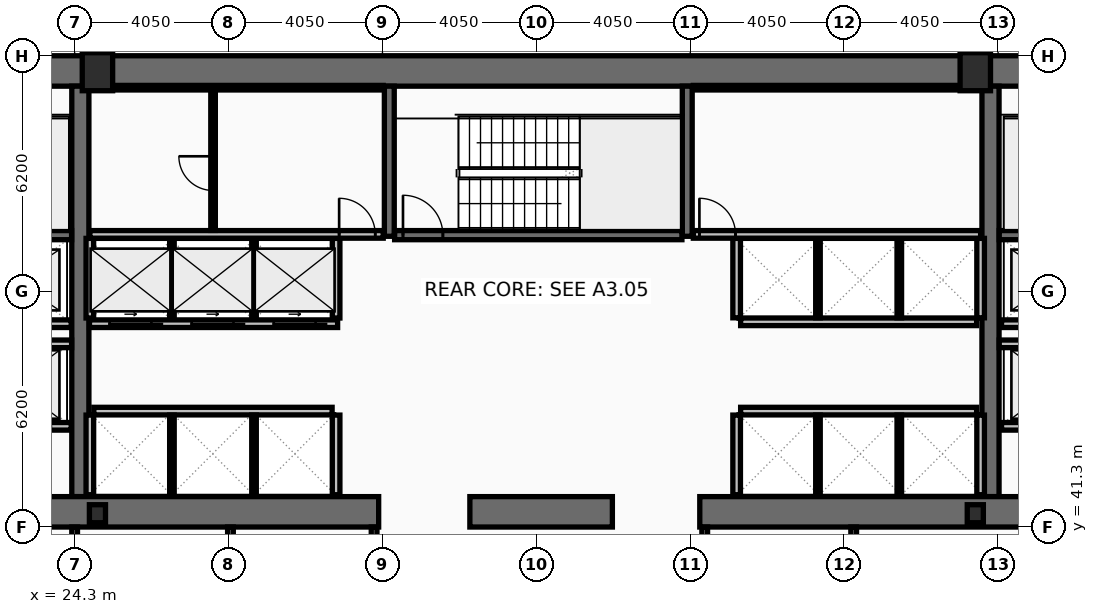
"""IFC4 building model, lengths in metres.
Left out: names, types, materials, properties, quantities, classifications, styles, units other than length and angle.
Written with IfcOpenShell. Run it as: python <this file> out.ifc"""

import sys

from ifc_helpers import new_model, si_unit, direction, frame, frame_2d, origin, origin_2d, place, context, subcontext, project, spatial, rectangle, hollow_rectangle, i_section, extrude, element, fill, save


model = new_model("IFC4")
c1 = context("Model", 3, precision=1e-05, world=origin(), true_north=direction((0.0, 1.0)))
c2 = subcontext(c1, "Body", "Model", "MODEL_VIEW")
j1 = project(units=[si_unit("LENGTHUNIT", "METRE"), si_unit("PLANEANGLEUNIT", "RADIAN")], contexts=[c1])
p1 = place(None, origin())
s1 = spatial("IfcSite", under=j1, at=p1, CompositionType="ELEMENT")
p2 = place(p1, origin())
s2 = spatial("IfcBuilding", under=s1, at=p2, CompositionType="ELEMENT")
p3 = place(p2, frame((0.0, 0.0, 29.8)))
s3 = spatial("IfcBuildingStorey", under=s2, at=p3, CompositionType="ELEMENT", Elevation=29.8)
p4 = place(p3, frame((16.2, 53.3, 0.0), z_axis=(0.0, 0.0, 1.0), x_axis=(1.0, 0.0, 0.0)))
e1 = element("IfcWall", 1, at=p4, inside=s3, PredefinedType="SHEAR", context=c2, shape_type="SweptSolid", body=[
    extrude(rectangle(XDim=40.5, YDim=0.8, at=frame_2d((20.25, 0.0))), origin(), (0.0, 0.0, 1.0), 3.82),
])
for number, where, z_axis, x_axis in (
    (2, (24.45, 42.1, 0.0), (0.0, 0.0, 1.0), (0.0, 1.0, 0.0)),
    (3, (48.4, 42.1, 0.0), (0.0, 0.0, 1.0), (0.0, 1.0, 0.0)),
):
    element("IfcWall", number, at=place(p3, frame(where, z_axis=z_axis, x_axis=x_axis)), inside=s3, PredefinedType="SHEAR", context=c2, shape_type="SweptSolid", body=[
        extrude(rectangle(XDim=10.8, YDim=0.45, at=frame_2d((5.4, 0.0))), origin(), (0.0, 0.0, 1.0), 3.82),
    ])
p5 = place(p3, frame((32.3, 41.7, 0.0), z_axis=(0.0, 0.0, 1.0), x_axis=(-1.0, 0.0, 0.0)))
e4 = element("IfcWall", 4, at=p5, inside=s3, PredefinedType="SHEAR", context=c2, shape_type="SweptSolid", body=[
    extrude(rectangle(XDim=11.45, YDim=0.8, at=frame_2d((5.725, 0.0))), origin(), (0.0, 0.0, 1.0), 3.82),
])
p6 = place(p3, frame((38.45, 41.7, 0.0), z_axis=(0.0, 0.0, 1.0), x_axis=(-1.0, 0.0, 0.0)))
e5 = element("IfcWall", 5, at=p6, inside=s3, PredefinedType="SHEAR", context=c2, shape_type="SweptSolid", body=[
    extrude(rectangle(XDim=3.75, YDim=0.8, at=frame_2d((1.875, 0.0))), origin(), (0.0, 0.0, 1.0), 3.82),
])
p7 = place(p3, frame((52.05, 41.7, 0.0), z_axis=(0.0, 0.0, 1.0), x_axis=(-1.0, 0.0, 0.0)))
e6 = element("IfcWall", 6, at=p7, inside=s3, PredefinedType="SHEAR", context=c2, shape_type="SweptSolid", body=[
    extrude(rectangle(XDim=11.3, YDim=0.8, at=frame_2d((5.65, 0.0))), origin(), (0.0, 0.0, 1.0), 3.82),
])
for number, where, z_axis, x_axis in (
    (7, (32.58, 48.95, 0.0), (0.0, 0.0, 1.0), (0.0, 1.0, 0.0)),
    (8, (40.42, 48.95, 0.0), (0.0, 0.0, 1.0), (0.0, 1.0, 0.0)),
):
    element("IfcWall", number, at=place(p3, frame(where, z_axis=z_axis, x_axis=x_axis)), inside=s3, PredefinedType="SHEAR", context=c2, shape_type="SweptSolid", body=[
        extrude(rectangle(XDim=3.95, YDim=0.26, at=frame_2d((1.975, 0.0))), origin(), (0.0, 0.0, 1.0), 3.82),
    ])
p8 = place(p3, frame((17.0, 48.98, 0.0), z_axis=(0.0, 0.0, 1.0), x_axis=(1.0, 0.0, 0.0)))
e9 = element("IfcWall", 9, at=p8, inside=s3, PredefinedType="SHEAR", context=c2, shape_type="SweptSolid", body=[
    extrude(rectangle(XDim=7.22, YDim=0.24, at=frame_2d((3.61, 0.0))), origin(), (0.0, 0.0, 1.0), 3.82),
])
p9 = place(p8, frame((0.22, 0.0, 0.0)))
e10 = element("IfcOpeningElement", 10, at=p9, cuts=e9, PredefinedType="OPENING", context=c2, shape_type="SweptSolid", body=[
    extrude(rectangle(XDim=1.05, YDim=2.15, at=frame_2d((0.525, 1.075))), frame((0.0, 0.13, 0.0), z_axis=(0.0, -1.0, 0.0), x_axis=(1.0, 0.0, 0.0)), (0.0, 0.0, 1.0), 0.26),
])
p10 = place(p3, frame((48.63, 48.98, 0.0), z_axis=(0.0, 0.0, 1.0), x_axis=(1.0, 0.0, 0.0)))
e11 = element("IfcWall", 11, at=p10, inside=s3, PredefinedType="SHEAR", context=c2, shape_type="SweptSolid", body=[
    extrude(rectangle(XDim=7.27, YDim=0.24, at=frame_2d((3.635, 0.0))), origin(), (0.0, 0.0, 1.0), 3.82),
])
p11 = place(p10, frame((6.0, 0.0, 0.0)))
e12 = element("IfcOpeningElement", 12, at=p11, cuts=e11, PredefinedType="OPENING", context=c2, shape_type="SweptSolid", body=[
    extrude(rectangle(XDim=1.05, YDim=2.15, at=frame_2d((0.525, 1.075))), frame((0.0, 0.13, 0.0), z_axis=(0.0, -1.0, 0.0), x_axis=(1.0, 0.0, 0.0)), (0.0, 0.0, 1.0), 0.26),
])
p12 = place(p3, frame((32.72, 48.98, 0.0), z_axis=(0.0, 0.0, 1.0), x_axis=(1.0, 0.0, 0.0)))
e13 = element("IfcWall", 13, at=p12, inside=s3, PredefinedType="SHEAR", context=c2, shape_type="SweptSolid", body=[
    extrude(rectangle(XDim=7.56, YDim=0.24, at=frame_2d((3.78, 0.0))), origin(), (0.0, 0.0, 1.0), 3.82),
])
p13 = place(p12, frame((0.22, 0.0, 0.0)))
e14 = element("IfcOpeningElement", 14, at=p13, cuts=e13, PredefinedType="OPENING", context=c2, shape_type="SweptSolid", body=[
    extrude(rectangle(XDim=1.05, YDim=2.15, at=frame_2d((0.525, 1.075))), frame((0.0, 0.13, 0.0), z_axis=(0.0, -1.0, 0.0), x_axis=(1.0, 0.0, 0.0)), (0.0, 0.0, 1.0), 0.26),
])
for number, where, z_axis, x_axis in (
    (15, (24.9, 53.28, 0.0), (0.0, 0.0, 1.0), (1.0, 0.0, 0.0)),
    (16, (48.0, 53.28, 0.0), (0.0, 0.0, 1.0), (1.0, 0.0, 0.0)),
):
    element("IfcColumn", number, at=place(p3, frame(where, z_axis=z_axis, x_axis=x_axis)), inside=s3, PredefinedType="COLUMN", context=c2, shape_type="SweptSolid", body=[
        extrude(hollow_rectangle(XDim=0.8, YDim=1.0, WallThickness=0.055, at=origin_2d()), origin(), (0.0, 0.0, 1.0), 4.0),
    ])
for number, where, z_axis, x_axis in (
    (17, (24.9, 41.65, 0.0), (0.0, 0.0, 1.0), (1.0, 0.0, 0.0)),
    (18, (48.0, 41.65, 0.0), (0.0, 0.0, 1.0), (1.0, 0.0, 0.0)),
):
    element("IfcColumn", number, at=place(p3, frame(where, z_axis=z_axis, x_axis=x_axis)), inside=s3, PredefinedType="COLUMN", context=c2, shape_type="SweptSolid", body=[
        extrude(i_section(OverallWidth=0.424, OverallDepth=0.474, WebThickness=0.048, FlangeThickness=0.077, at=origin_2d()), origin(), (0.0, 0.0, 1.0), 4.0),
    ])
p14 = place(p3, frame((51.61, 43.95, 0.0), z_axis=(0.0, 0.0, 1.0), x_axis=(-1.0, 0.0, 0.0)))
e19 = element("IfcWall", 19, at=p14, inside=s3, PredefinedType="PARTITIONING", context=c2, shape_type="SweptSolid", body=[
    extrude(rectangle(XDim=2.92, YDim=0.2, at=frame_2d((1.46, 0.0))), origin(), (0.0, 0.0, 1.0), 3.82),
])
p15 = place(p14, frame((0.81, 0.0, 0.0)))
e20 = element("IfcOpeningElement", 20, at=p15, cuts=e19, PredefinedType="OPENING", context=c2, shape_type="SweptSolid", body=[
    extrude(rectangle(XDim=1.3, YDim=2.18, at=frame_2d((0.65, 1.09))), frame((0.0, 0.11, 0.0), z_axis=(0.0, -1.0, 0.0), x_axis=(1.0, 0.0, 0.0)), (0.0, 0.0, 1.0), 0.22),
])
p16 = place(p3, frame((24.21, 43.95, 0.0), z_axis=(0.0, 0.0, 1.0), x_axis=(-1.0, 0.0, 0.0)))
e21 = element("IfcWall", 21, at=p16, inside=s3, PredefinedType="PARTITIONING", context=c2, shape_type="SweptSolid", body=[
    extrude(rectangle(XDim=2.97, YDim=0.2, at=frame_2d((1.485, 0.0))), origin(), (0.0, 0.0, 1.0), 3.82),
])
p17 = place(p16, frame((0.86, 0.0, 0.0)))
e22 = element("IfcOpeningElement", 22, at=p17, cuts=e21, PredefinedType="OPENING", context=c2, shape_type="SweptSolid", body=[
    extrude(rectangle(XDim=1.3, YDim=2.18, at=frame_2d((0.65, 1.09))), frame((0.0, 0.11, 0.0), z_axis=(0.0, -1.0, 0.0), x_axis=(1.0, 0.0, 0.0)), (0.0, 0.0, 1.0), 0.22),
])
p18 = place(p3, frame((51.61, 46.65, 0.0), z_axis=(0.0, 0.0, 1.0), x_axis=(-1.0, 0.0, 0.0)))
e23 = element("IfcWall", 23, at=p18, inside=s3, PredefinedType="PARTITIONING", context=c2, shape_type="SweptSolid", body=[
    extrude(rectangle(XDim=2.92, YDim=0.2, at=frame_2d((1.46, 0.0))), origin(), (0.0, 0.0, 1.0), 3.82),
])
p19 = place(p18, frame((0.86, 0.0, 0.0)))
e24 = element("IfcOpeningElement", 24, at=p19, cuts=e23, PredefinedType="OPENING", context=c2, shape_type="SweptSolid", body=[
    extrude(rectangle(XDim=1.2, YDim=2.18, at=frame_2d((0.6, 1.09))), frame((0.0, 0.11, 0.0), z_axis=(0.0, -1.0, 0.0), x_axis=(1.0, 0.0, 0.0)), (0.0, 0.0, 1.0), 0.22),
])
p20 = place(p3, frame((24.21, 46.65, 0.0), z_axis=(0.0, 0.0, 1.0), x_axis=(-1.0, 0.0, 0.0)))
e25 = element("IfcWall", 25, at=p20, inside=s3, PredefinedType="PARTITIONING", context=c2, shape_type="SweptSolid", body=[
    extrude(rectangle(XDim=2.97, YDim=0.2, at=frame_2d((1.485, 0.0))), origin(), (0.0, 0.0, 1.0), 3.82),
])
p21 = place(p20, frame((0.91, 0.0, 0.0)))
e26 = element("IfcOpeningElement", 26, at=p21, cuts=e25, PredefinedType="OPENING", context=c2, shape_type="SweptSolid", body=[
    extrude(rectangle(XDim=1.2, YDim=2.18, at=frame_2d((0.6, 1.09))), frame((0.0, 0.11, 0.0), z_axis=(0.0, -1.0, 0.0), x_axis=(1.0, 0.0, 0.0)), (0.0, 0.0, 1.0), 0.22),
])
p22 = place(p3, frame((31.22, 46.65, 0.0), z_axis=(0.0, 0.0, 1.0), x_axis=(-1.0, 0.0, 0.0)))
e27 = element("IfcWall", 27, at=p22, inside=s3, PredefinedType="PARTITIONING", context=c2, shape_type="SweptSolid", body=[
    extrude(rectangle(XDim=6.53, YDim=0.2, at=frame_2d((3.265, 0.0))), origin(), (0.0, 0.0, 1.0), 3.82),
])
p23 = place(p22, frame((4.9, 0.0, 0.0)))
e28 = element("IfcOpeningElement", 28, at=p23, cuts=e27, PredefinedType="OPENING", context=c2, shape_type="SweptSolid", body=[
    extrude(rectangle(XDim=1.1, YDim=2.18, at=frame_2d((0.55, 1.09))), frame((0.0, 0.11, 0.0), z_axis=(0.0, -1.0, 0.0), x_axis=(1.0, 0.0, 0.0)), (0.0, 0.0, 1.0), 0.22),
])
p24 = place(p22, frame((2.74, 0.0, 0.0)))
e29 = element("IfcOpeningElement", 29, at=p24, cuts=e27, PredefinedType="OPENING", context=c2, shape_type="SweptSolid", body=[
    extrude(rectangle(XDim=1.1, YDim=2.18, at=frame_2d((0.55, 1.09))), frame((0.0, 0.11, 0.0), z_axis=(0.0, -1.0, 0.0), x_axis=(1.0, 0.0, 0.0)), (0.0, 0.0, 1.0), 0.22),
])
p25 = place(p22, frame((0.58, 0.0, 0.0)))
e30 = element("IfcOpeningElement", 30, at=p25, cuts=e27, PredefinedType="OPENING", context=c2, shape_type="SweptSolid", body=[
    extrude(rectangle(XDim=1.1, YDim=2.18, at=frame_2d((0.55, 1.09))), frame((0.0, 0.11, 0.0), z_axis=(0.0, -1.0, 0.0), x_axis=(1.0, 0.0, 0.0)), (0.0, 0.0, 1.0), 0.22),
])
p26 = place(p3, frame((21.2, 46.12, 0.0), z_axis=(0.0, 0.0, 1.0), x_axis=(1.0, 0.0, 0.0)))
e31 = element("IfcWall", 31, at=p26, inside=s3, PredefinedType="PARTITIONING", context=c2, shape_type="SweptSolid", body=[
    extrude(rectangle(XDim=3.02, YDim=0.2, at=frame_2d((1.51, 0.0))), origin(), (0.0, 0.0, 1.0), 3.82),
])
p27 = place(p3, frame((48.63, 46.12, 0.0), z_axis=(0.0, 0.0, 1.0), x_axis=(1.0, 0.0, 0.0)))
e32 = element("IfcWall", 32, at=p27, inside=s3, PredefinedType="PARTITIONING", context=c2, shape_type="SweptSolid", body=[
    extrude(rectangle(XDim=3.07, YDim=0.2, at=frame_2d((1.535, 0.0))), origin(), (0.0, 0.0, 1.0), 3.82),
])
for number, where, z_axis, x_axis in (
    (33, (24.7, 46.8, 0.0), (0.0, 0.0, 1.0), (0.0, 1.0, 0.0)),
    (34, (31.18, 46.8, 0.0), (0.0, 0.0, 1.0), (0.0, 1.0, 0.0)),
):
    element("IfcWall", number, at=place(p3, frame(where, z_axis=z_axis, x_axis=x_axis)), inside=s3, PredefinedType="PARTITIONING", context=c2, shape_type="SweptSolid", body=[
        extrude(rectangle(XDim=2.095, YDim=0.2, at=frame_2d((1.047, 0.0))), origin(), (0.0, 0.0, 1.0), 3.82),
    ])
for number, where, z_axis, x_axis in (
    (35, (26.86, 46.8, 0.0), (0.0, 0.0, 1.0), (0.0, 1.0, 0.0)),
    (36, (29.02, 46.8, 0.0), (0.0, 0.0, 1.0), (0.0, 1.0, 0.0)),
):
    element("IfcWall", number, at=place(p3, frame(where, z_axis=z_axis, x_axis=x_axis)), inside=s3, PredefinedType="PARTITIONING", context=c2, shape_type="SweptSolid", body=[
        extrude(rectangle(XDim=2.095, YDim=0.12, at=frame_2d((1.047, 0.0))), origin(), (0.0, 0.0, 1.0), 3.82),
    ])
p28 = place(p3, frame((24.805, 44.35, 0.0), z_axis=(0.0, 0.0, 1.0), x_axis=(1.0, 0.0, 0.0)))
e37 = element("IfcWall", 37, at=p28, inside=s3, PredefinedType="PARTITIONING", context=c2, shape_type="SweptSolid", body=[
    extrude(rectangle(XDim=6.27, YDim=0.2, at=frame_2d((3.135, 0.0))), origin(), (0.0, 0.0, 1.0), 3.82),
])
for number, where, z_axis, x_axis in (
    (38, (24.7, 42.15, 0.0), (0.0, 0.0, 1.0), (0.0, 1.0, 0.0)),
    (39, (31.18, 42.15, 0.0), (0.0, 0.0, 1.0), (0.0, 1.0, 0.0)),
):
    element("IfcWall", number, at=place(p3, frame(where, z_axis=z_axis, x_axis=x_axis)), inside=s3, PredefinedType="PARTITIONING", context=c2, shape_type="SweptSolid", body=[
        extrude(rectangle(XDim=2.095, YDim=0.2, at=frame_2d((1.048, 0.0))), origin(), (0.0, 0.0, 1.0), 3.82),
    ])
for number, where, z_axis, x_axis in (
    (40, (26.86, 42.15, 0.0), (0.0, 0.0, 1.0), (0.0, 1.0, 0.0)),
    (41, (29.02, 42.15, 0.0), (0.0, 0.0, 1.0), (0.0, 1.0, 0.0)),
):
    element("IfcWall", number, at=place(p3, frame(where, z_axis=z_axis, x_axis=x_axis)), inside=s3, PredefinedType="PARTITIONING", context=c2, shape_type="SweptSolid", body=[
        extrude(rectangle(XDim=2.095, YDim=0.12, at=frame_2d((1.048, 0.0))), origin(), (0.0, 0.0, 1.0), 3.82),
    ])
p29 = place(p3, frame((41.825, 46.7, 0.0), z_axis=(0.0, 0.0, 1.0), x_axis=(1.0, 0.0, 0.0)))
e42 = element("IfcWall", 42, at=p29, inside=s3, PredefinedType="PARTITIONING", context=c2, shape_type="SweptSolid", body=[
    extrude(rectangle(XDim=6.21, YDim=0.2, at=frame_2d((3.105, 0.0))), origin(), (0.0, 0.0, 1.0), 3.82),
])
for number, where, z_axis, x_axis in (
    (43, (41.72, 46.805, 0.0), (0.0, 0.0, 1.0), (0.0, 1.0, 0.0)),
    (44, (48.14, 46.805, 0.0), (0.0, 0.0, 1.0), (0.0, 1.0, 0.0)),
):
    element("IfcWall", number, at=place(p3, frame(where, z_axis=z_axis, x_axis=x_axis)), inside=s3, PredefinedType="PARTITIONING", context=c2, shape_type="SweptSolid", body=[
        extrude(rectangle(XDim=2.09, YDim=0.2, at=frame_2d((1.045, 0.0))), origin(), (0.0, 0.0, 1.0), 3.82),
    ])
for number, where, z_axis, x_axis in (
    (45, (43.86, 46.805, 0.0), (0.0, 0.0, 1.0), (0.0, 1.0, 0.0)),
    (46, (46.0, 46.805, 0.0), (0.0, 0.0, 1.0), (0.0, 1.0, 0.0)),
):
    element("IfcWall", number, at=place(p3, frame(where, z_axis=z_axis, x_axis=x_axis)), inside=s3, PredefinedType="PARTITIONING", context=c2, shape_type="SweptSolid", body=[
        extrude(rectangle(XDim=2.09, YDim=0.12, at=frame_2d((1.045, 0.0))), origin(), (0.0, 0.0, 1.0), 3.82),
    ])
p30 = place(p3, frame((41.825, 44.35, 0.0), z_axis=(0.0, 0.0, 1.0), x_axis=(1.0, 0.0, 0.0)))
e47 = element("IfcWall", 47, at=p30, inside=s3, PredefinedType="PARTITIONING", context=c2, shape_type="SweptSolid", body=[
    extrude(rectangle(XDim=6.21, YDim=0.2, at=frame_2d((3.105, 0.0))), origin(), (0.0, 0.0, 1.0), 3.82),
])
for number, where, z_axis, x_axis in (
    (48, (41.72, 42.15, 0.0), (0.0, 0.0, 1.0), (0.0, 1.0, 0.0)),
    (49, (48.14, 42.15, 0.0), (0.0, 0.0, 1.0), (0.0, 1.0, 0.0)),
):
    element("IfcWall", number, at=place(p3, frame(where, z_axis=z_axis, x_axis=x_axis)), inside=s3, PredefinedType="PARTITIONING", context=c2, shape_type="SweptSolid", body=[
        extrude(rectangle(XDim=2.095, YDim=0.2, at=frame_2d((1.048, 0.0))), origin(), (0.0, 0.0, 1.0), 3.82),
    ])
for number, where, z_axis, x_axis in (
    (50, (43.86, 42.15, 0.0), (0.0, 0.0, 1.0), (0.0, 1.0, 0.0)),
    (51, (46.0, 42.15, 0.0), (0.0, 0.0, 1.0), (0.0, 1.0, 0.0)),
):
    element("IfcWall", number, at=place(p3, frame(where, z_axis=z_axis, x_axis=x_axis)), inside=s3, PredefinedType="PARTITIONING", context=c2, shape_type="SweptSolid", body=[
        extrude(rectangle(XDim=2.095, YDim=0.12, at=frame_2d((1.048, 0.0))), origin(), (0.0, 0.0, 1.0), 3.82),
    ])
p31 = place(p3, frame((24.7, 52.86, 0.0), z_axis=(0.0, 0.0, 1.0), x_axis=(1.0, 0.0, 0.0)))
e52 = element("IfcWall", 52, at=p31, inside=s3, PredefinedType="PARTITIONING", context=c2, shape_type="SweptSolid", body=[
    extrude(rectangle(XDim=7.72, YDim=0.12, at=frame_2d((3.86, 0.0))), origin(), (0.0, 0.0, 1.0), 3.82),
])
p32 = place(p3, frame((24.7, 49.0, 0.0), z_axis=(0.0, 0.0, 1.0), x_axis=(1.0, 0.0, 0.0)))
e53 = element("IfcWall", 53, at=p32, inside=s3, PredefinedType="PARTITIONING", context=c2, shape_type="SweptSolid", body=[
    extrude(rectangle(XDim=7.72, YDim=0.2, at=frame_2d((3.86, 0.0))), origin(), (0.0, 0.0, 1.0), 3.82),
])
p33 = place(p32, frame((6.56, 0.0, 0.0)))
e54 = element("IfcOpeningElement", 54, at=p33, cuts=e53, PredefinedType="OPENING", context=c2, shape_type="SweptSolid", body=[
    extrude(rectangle(XDim=0.95, YDim=2.1, at=frame_2d((0.475, 1.05))), frame((0.0, 0.11, 0.0), z_axis=(0.0, -1.0, 0.0), x_axis=(1.0, 0.0, 0.0)), (0.0, 0.0, 1.0), 0.22),
])
p34 = place(p3, frame((27.942, 49.105, 0.0), z_axis=(0.0, 0.0, 1.0), x_axis=(0.0, 1.0, 0.0)))
e55 = element("IfcWall", 55, at=p34, inside=s3, PredefinedType="PARTITIONING", context=c2, shape_type="SweptSolid", body=[
    extrude(rectangle(XDim=3.69, YDim=0.12, at=frame_2d((1.845, 0.0))), origin(), (0.0, 0.0, 1.0), 3.82),
])
p35 = place(p34, frame((1.05, 0.0, 0.0)))
e56 = element("IfcOpeningElement", 56, at=p35, cuts=e55, PredefinedType="OPENING", context=c2, shape_type="SweptSolid", body=[
    extrude(rectangle(XDim=0.9, YDim=2.05, at=frame_2d((0.45, 1.025))), frame((0.0, 0.07, 0.0), z_axis=(0.0, -1.0, 0.0), x_axis=(1.0, 0.0, 0.0)), (0.0, 0.0, 1.0), 0.14),
])
p36 = place(p3, frame((40.58, 52.86, 0.0), z_axis=(0.0, 0.0, 1.0), x_axis=(1.0, 0.0, 0.0)))
e57 = element("IfcWall", 57, at=p36, inside=s3, PredefinedType="PARTITIONING", context=c2, shape_type="SweptSolid", body=[
    extrude(rectangle(XDim=7.56, YDim=0.12, at=frame_2d((3.78, 0.0))), origin(), (0.0, 0.0, 1.0), 3.82),
])
p37 = place(p3, frame((40.58, 49.0, 0.0), z_axis=(0.0, 0.0, 1.0), x_axis=(1.0, 0.0, 0.0)))
e58 = element("IfcWall", 58, at=p37, inside=s3, PredefinedType="PARTITIONING", context=c2, shape_type="SweptSolid", body=[
    extrude(rectangle(XDim=7.56, YDim=0.2, at=frame_2d((3.78, 0.0))), origin(), (0.0, 0.0, 1.0), 3.82),
])
p38 = place(p37, frame((0.16, 0.0, 0.0)))
e59 = element("IfcOpeningElement", 59, at=p38, cuts=e58, PredefinedType="OPENING", context=c2, shape_type="SweptSolid", body=[
    extrude(rectangle(XDim=0.95, YDim=2.1, at=frame_2d((0.475, 1.05))), frame((0.0, 0.11, 0.0), z_axis=(0.0, -1.0, 0.0), x_axis=(1.0, 0.0, 0.0)), (0.0, 0.0, 1.0), 0.22),
])
for number, where, z_axis, x_axis in (
    (60, (24.3, 38.28, 0.0), (0.0, 0.0, 1.0), (0.0, 1.0, 0.0)),
    (61, (28.4, 38.28, 0.0), (0.0, 0.0, 1.0), (0.0, 1.0, 0.0)),
    (62, (32.18, 38.28, 0.0), (0.0, 0.0, 1.0), (0.0, 1.0, 0.0)),
    (63, (40.88, 38.28, 0.0), (0.0, 0.0, 1.0), (0.0, 1.0, 0.0)),
    (64, (44.8, 38.28, 0.0), (0.0, 0.0, 1.0), (0.0, 1.0, 0.0)),
):
    element("IfcWall", number, at=place(p3, frame(where, z_axis=z_axis, x_axis=x_axis)), inside=s3, PredefinedType="PARTITIONING", context=c2, shape_type="SweptSolid", body=[
        extrude(rectangle(XDim=3.02, YDim=0.15, at=frame_2d((1.51, 0.0))), origin(), (0.0, 0.0, 1.0), 3.82),
    ])
p39 = place(p13, origin())
e65 = element("IfcDoor", 65, at=p39, inside=s3, OperationType="SINGLE_SWING_LEFT", PredefinedType="DOOR", context=c2, shape_type="SweptSolid", body=[
    extrude(rectangle(XDim=1.05, YDim=2.15, at=frame_2d((0.525, 1.075))), frame((0.0, 0.025, 0.0), z_axis=(0.0, -1.0, 0.0), x_axis=(1.0, 0.0, 0.0)), (0.0, 0.0, 1.0), 0.05),
])
fill(e14, e65)
p40 = place(p23, origin())
e66 = element("IfcDoor", 66, at=p40, inside=s3, OperationType="SLIDING_TO_LEFT", PredefinedType="DOOR", context=c2, shape_type="SweptSolid", body=[
    extrude(rectangle(XDim=1.1, YDim=2.18, at=frame_2d((0.55, 1.09))), frame((0.0, 0.025, 0.0), z_axis=(0.0, -1.0, 0.0), x_axis=(1.0, 0.0, 0.0)), (0.0, 0.0, 1.0), 0.05),
])
fill(e28, e66)
p41 = place(p24, origin())
e67 = element("IfcDoor", 67, at=p41, inside=s3, OperationType="SLIDING_TO_LEFT", PredefinedType="DOOR", context=c2, shape_type="SweptSolid", body=[
    extrude(rectangle(XDim=1.1, YDim=2.18, at=frame_2d((0.55, 1.09))), frame((0.0, 0.025, 0.0), z_axis=(0.0, -1.0, 0.0), x_axis=(1.0, 0.0, 0.0)), (0.0, 0.0, 1.0), 0.05),
])
fill(e29, e67)
p42 = place(p25, origin())
e68 = element("IfcDoor", 68, at=p42, inside=s3, OperationType="SLIDING_TO_LEFT", PredefinedType="DOOR", context=c2, shape_type="SweptSolid", body=[
    extrude(rectangle(XDim=1.1, YDim=2.18, at=frame_2d((0.55, 1.09))), frame((0.0, 0.025, 0.0), z_axis=(0.0, -1.0, 0.0), x_axis=(1.0, 0.0, 0.0)), (0.0, 0.0, 1.0), 0.05),
])
fill(e30, e68)
p43 = place(p33, origin())
e69 = element("IfcDoor", 69, at=p43, inside=s3, OperationType="SINGLE_SWING_LEFT", PredefinedType="DOOR", context=c2, shape_type="SweptSolid", body=[
    extrude(rectangle(XDim=0.95, YDim=2.1, at=frame_2d((0.475, 1.05))), frame((0.0, 0.025, 0.0), z_axis=(0.0, -1.0, 0.0), x_axis=(1.0, 0.0, 0.0)), (0.0, 0.0, 1.0), 0.05),
])
fill(e54, e69)
p44 = place(p35, origin())
e70 = element("IfcDoor", 70, at=p44, inside=s3, OperationType="SINGLE_SWING_RIGHT", PredefinedType="DOOR", context=c2, shape_type="SweptSolid", body=[
    extrude(rectangle(XDim=0.9, YDim=2.05, at=frame_2d((0.45, 1.025))), frame((0.0, 0.025, 0.0), z_axis=(0.0, -1.0, 0.0), x_axis=(1.0, 0.0, 0.0)), (0.0, 0.0, 1.0), 0.05),
])
fill(e56, e70)
p45 = place(p38, origin())
e71 = element("IfcDoor", 71, at=p45, inside=s3, OperationType="SINGLE_SWING_LEFT", PredefinedType="DOOR", context=c2, shape_type="SweptSolid", body=[
    extrude(rectangle(XDim=0.95, YDim=2.1, at=frame_2d((0.475, 1.05))), frame((0.0, 0.025, 0.0), z_axis=(0.0, -1.0, 0.0), x_axis=(1.0, 0.0, 0.0)), (0.0, 0.0, 1.0), 0.05),
])
fill(e59, e71)
save(model, sys.argv[1])
